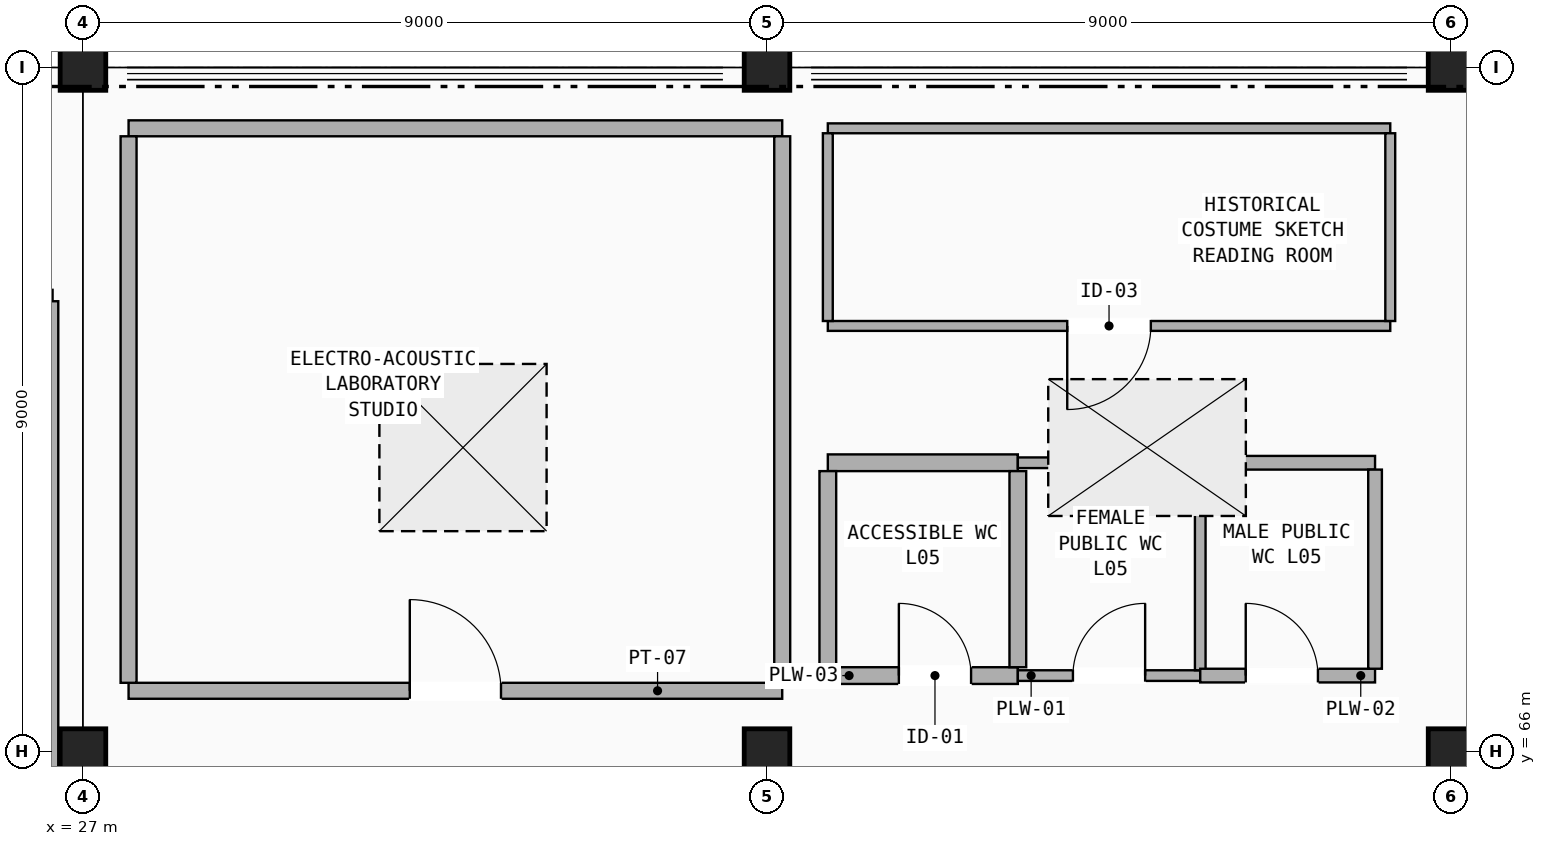
"""IFC4 building model, lengths in metres.
Left out: names, types, materials, properties, quantities, classifications, styles, units other than length and angle.
Written with IfcOpenShell. Run it as: python <this file> out.ifc"""

import sys

from ifc_helpers import new_model, si_unit, direction, frame, frame_2d, origin, origin_2d, place, context, subcontext, project, spatial, rectangle, extrude, element, fill, save


model = new_model("IFC4")
c1 = context("Model", 3, precision=1e-05, world=origin(), true_north=direction((0.0, 1.0)))
c2 = subcontext(c1, "Body", "Model", "MODEL_VIEW")
j1 = project(units=[si_unit("LENGTHUNIT", "METRE"), si_unit("PLANEANGLEUNIT", "RADIAN")], contexts=[c1])
p1 = place(None, origin())
s1 = spatial("IfcSite", under=j1, at=p1, CompositionType="ELEMENT")
p2 = place(p1, origin())
s2 = spatial("IfcBuilding", under=s1, at=p2, CompositionType="ELEMENT")
p3 = place(p2, frame((0.0, 0.0, 21.76)))
s3 = spatial("IfcBuildingStorey", under=s2, at=p3, CompositionType="ELEMENT", Elevation=21.76)
p4 = place(p3, frame((27.0, 66.0, 0.0), z_axis=(0.0, 0.0, 1.0), x_axis=(1.0, 0.0, 0.0)))
e1 = element("IfcColumn", 1, at=p4, inside=s3, PredefinedType="COLUMN", context=c2, shape_type="SweptSolid", body=[
    extrude(rectangle(XDim=0.6, YDim=0.6, at=origin_2d()), origin(), (0.0, 0.0, 1.0), 7.987),
])
p5 = place(p3, frame((27.0, 75.0, 0.0), z_axis=(0.0, 0.0, 1.0), x_axis=(1.0, 0.0, 0.0)))
e2 = element("IfcColumn", 2, at=p5, inside=s3, PredefinedType="COLUMN", context=c2, shape_type="SweptSolid", body=[
    extrude(rectangle(XDim=0.6, YDim=0.6, at=origin_2d()), origin(), (0.0, 0.0, 1.0), 9.0),
])
p6 = place(p3, frame((36.0, 66.0, 0.0), z_axis=(0.0, 0.0, 1.0), x_axis=(1.0, 0.0, 0.0)))
e3 = element("IfcColumn", 3, at=p6, inside=s3, PredefinedType="COLUMN", context=c2, shape_type="SweptSolid", body=[
    extrude(rectangle(XDim=0.6, YDim=0.6, at=origin_2d()), origin(), (0.0, 0.0, 1.0), 7.987),
])
p7 = place(p3, frame((36.0, 75.0, 0.0), z_axis=(0.0, 0.0, 1.0), x_axis=(1.0, 0.0, 0.0)))
e4 = element("IfcColumn", 4, at=p7, inside=s3, PredefinedType="COLUMN", context=c2, shape_type="SweptSolid", body=[
    extrude(rectangle(XDim=0.6, YDim=0.6, at=origin_2d()), origin(), (0.0, 0.0, 1.0), 9.0),
])
p8 = place(p3, frame((45.0, 66.0, 0.0), z_axis=(0.0, 0.0, 1.0), x_axis=(1.0, 0.0, 0.0)))
e5 = element("IfcColumn", 5, at=p8, inside=s3, PredefinedType="COLUMN", context=c2, shape_type="SweptSolid", body=[
    extrude(rectangle(XDim=0.6, YDim=0.6, at=origin_2d()), origin(), (0.0, 0.0, 1.0), 7.987),
])
p9 = place(p3, frame((45.0, 75.0, 0.0), z_axis=(0.0, 0.0, 1.0), x_axis=(1.0, 0.0, 0.0)))
e6 = element("IfcColumn", 6, at=p9, inside=s3, PredefinedType="COLUMN", context=c2, shape_type="SweptSolid", body=[
    extrude(rectangle(XDim=0.6, YDim=0.6, at=origin_2d()), origin(), (0.0, 0.0, 1.0), 9.0),
])
p10 = place(p3, frame((36.8, 67.0, 0.0), z_axis=(0.0, 0.0, 1.0), x_axis=(1.0, 0.0, 0.0)))
e7 = element("IfcWall", 7, at=p10, inside=s3, PredefinedType="PLUMBINGWALL", context=c2, shape_type="SweptSolid", body=[
    extrude(rectangle(XDim=2.5, YDim=0.22, at=frame_2d((1.25, 0.0))), origin(), (0.0, 0.0, 1.0), 8.521),
])
p11 = place(p10, frame((0.935, 0.0, 0.0)))
e8 = element("IfcOpeningElement", 8, at=p11, cuts=e7, PredefinedType="OPENING", context=c2, shape_type="SweptSolid", body=[
    extrude(rectangle(XDim=0.95, YDim=2.15, at=frame_2d((0.475, 1.075))), frame((0.0, 0.12, 0.0), z_axis=(0.0, -1.0, 0.0), x_axis=(1.0, 0.0, 0.0)), (0.0, 0.0, 1.0), 0.24),
])
p12 = place(p3, frame((36.8, 69.8, 0.0), z_axis=(0.0, 0.0, 1.0), x_axis=(1.0, 0.0, 0.0)))
e9 = element("IfcWall", 9, at=p12, inside=s3, PredefinedType="PLUMBINGWALL", context=c2, shape_type="SweptSolid", body=[
    extrude(rectangle(XDim=2.5, YDim=0.22, at=frame_2d((1.25, 0.0))), origin(), (0.0, 0.0, 1.0), 8.521),
])
for number, where, z_axis, x_axis in (
    (10, (36.8, 67.11, 0.0), (0.0, 0.0, 1.0), (0.0, 1.0, 0.0)),
    (11, (39.3, 67.11, 0.0), (0.0, 0.0, 1.0), (0.0, 1.0, 0.0)),
):
    element("IfcWall", number, at=place(p3, frame(where, z_axis=z_axis, x_axis=x_axis)), inside=s3, PredefinedType="PLUMBINGWALL", context=c2, shape_type="SweptSolid", body=[
        extrude(rectangle(XDim=2.58, YDim=0.22, at=frame_2d((1.29, 0.0))), origin(), (0.0, 0.0, 1.0), 8.521),
    ])
p13 = place(p3, frame((39.3, 67.0, 0.0), z_axis=(0.0, 0.0, 1.0), x_axis=(1.0, 0.0, 0.0)))
e12 = element("IfcWall", 12, at=p13, inside=s3, PredefinedType="PLUMBINGWALL", context=c2, shape_type="SweptSolid", body=[
    extrude(rectangle(XDim=2.4, YDim=0.14, at=frame_2d((1.2, 0.0))), origin(), (0.0, 0.0, 1.0), 8.521),
])
p14 = place(p13, frame((0.725, 0.0, 0.0)))
e13 = element("IfcOpeningElement", 13, at=p14, cuts=e12, PredefinedType="OPENING", context=c2, shape_type="SweptSolid", body=[
    extrude(rectangle(XDim=0.95, YDim=2.15, at=frame_2d((0.475, 1.075))), frame((0.0, 0.08, 0.0), z_axis=(0.0, -1.0, 0.0), x_axis=(1.0, 0.0, 0.0)), (0.0, 0.0, 1.0), 0.16),
])
p15 = place(p3, frame((39.3, 69.8, 0.0), z_axis=(0.0, 0.0, 1.0), x_axis=(1.0, 0.0, 0.0)))
e14 = element("IfcWall", 14, at=p15, inside=s3, PredefinedType="PLUMBINGWALL", context=c2, shape_type="SweptSolid", body=[
    extrude(rectangle(XDim=2.4, YDim=0.14, at=frame_2d((1.2, 0.0))), origin(), (0.0, 0.0, 1.0), 8.521),
])
p16 = place(p3, frame((41.7, 67.07, 0.0), z_axis=(0.0, 0.0, 1.0), x_axis=(0.0, 1.0, 0.0)))
e15 = element("IfcWall", 15, at=p16, inside=s3, PredefinedType="PLUMBINGWALL", context=c2, shape_type="SweptSolid", body=[
    extrude(rectangle(XDim=2.66, YDim=0.14, at=frame_2d((1.33, 0.0))), origin(), (0.0, 0.0, 1.0), 8.521),
])
p17 = place(p3, frame((41.7, 67.0, 0.0), z_axis=(0.0, 0.0, 1.0), x_axis=(1.0, 0.0, 0.0)))
e16 = element("IfcWall", 16, at=p17, inside=s3, PredefinedType="PLUMBINGWALL", context=c2, shape_type="SweptSolid", body=[
    extrude(rectangle(XDim=2.3, YDim=0.18, at=frame_2d((1.15, 0.0))), origin(), (0.0, 0.0, 1.0), 8.521),
])
p18 = place(p17, frame((0.598, 0.0, 0.0)))
e17 = element("IfcOpeningElement", 17, at=p18, cuts=e16, PredefinedType="OPENING", context=c2, shape_type="SweptSolid", body=[
    extrude(rectangle(XDim=0.95, YDim=2.15, at=frame_2d((0.475, 1.075))), frame((0.0, 0.1, 0.0), z_axis=(0.0, -1.0, 0.0), x_axis=(1.0, 0.0, 0.0)), (0.0, 0.0, 1.0), 0.2),
])
p19 = place(p3, frame((41.7, 69.8, 0.0), z_axis=(0.0, 0.0, 1.0), x_axis=(1.0, 0.0, 0.0)))
e18 = element("IfcWall", 18, at=p19, inside=s3, PredefinedType="PLUMBINGWALL", context=c2, shape_type="SweptSolid", body=[
    extrude(rectangle(XDim=2.3, YDim=0.18, at=frame_2d((1.15, 0.0))), origin(), (0.0, 0.0, 1.0), 8.521),
])
p20 = place(p3, frame((44.0, 67.09, 0.0), z_axis=(0.0, 0.0, 1.0), x_axis=(0.0, 1.0, 0.0)))
e19 = element("IfcWall", 19, at=p20, inside=s3, PredefinedType="PLUMBINGWALL", context=c2, shape_type="SweptSolid", body=[
    extrude(rectangle(XDim=2.62, YDim=0.18, at=frame_2d((1.31, 0.0))), origin(), (0.0, 0.0, 1.0), 8.521),
])
p21 = place(p3, frame((26.6, 56.275, 0.0), z_axis=(0.0, 0.0, 1.0), x_axis=(0.0, 1.0, 0.0)))
e20 = element("IfcWall", 20, at=p21, inside=s3, PredefinedType="PARTITIONING", context=c2, shape_type="SweptSolid", body=[
    extrude(rectangle(XDim=15.65, YDim=0.15, at=frame_2d((7.825, 0.0))), origin(), (0.0, 0.0, 1.0), 3.405),
])
p22 = place(p21, frame((6.119, 0.0, 0.0)))
e21 = element("IfcOpeningElement", 21, at=p22, cuts=e20, PredefinedType="OPENING", context=c2, shape_type="SweptSolid", body=[
    extrude(rectangle(XDim=1.4, YDim=2.2, at=frame_2d((0.7, 1.1))), frame((0.0, 0.085, 0.0), z_axis=(0.0, -1.0, 0.0), x_axis=(1.0, 0.0, 0.0)), (0.0, 0.0, 1.0), 0.17),
])
p23 = place(p3, frame((27.6, 66.8, 0.0), z_axis=(0.0, 0.0, 1.0), x_axis=(1.0, 0.0, 0.0)))
e22 = element("IfcWall", 22, at=p23, inside=s3, PredefinedType="PARTITIONING", context=c2, shape_type="SweptSolid", body=[
    extrude(rectangle(XDim=8.6, YDim=0.21, at=frame_2d((4.3, 0.0))), origin(), (0.0, 0.0, 1.0), 2.989),
])
p24 = place(p23, frame((3.7, 0.0, 0.0)))
e23 = element("IfcOpeningElement", 23, at=p24, cuts=e22, PredefinedType="OPENING", context=c2, shape_type="SweptSolid", body=[
    extrude(rectangle(XDim=1.2, YDim=2.2, at=frame_2d((0.6, 1.1))), frame((0.0, 0.115, 0.0), z_axis=(0.0, -1.0, 0.0), x_axis=(1.0, 0.0, 0.0)), (0.0, 0.0, 1.0), 0.23),
])
p25 = place(p3, frame((27.6, 74.2, 0.0), z_axis=(0.0, 0.0, 1.0), x_axis=(1.0, 0.0, 0.0)))
e24 = element("IfcWall", 24, at=p25, inside=s3, PredefinedType="PARTITIONING", context=c2, shape_type="SweptSolid", body=[
    extrude(rectangle(XDim=8.6, YDim=0.21, at=frame_2d((4.3, 0.0))), origin(), (0.0, 0.0, 1.0), 2.989),
])
p26 = place(p3, frame((27.6, 66.905, 0.0), z_axis=(0.0, 0.0, 1.0), x_axis=(0.0, 1.0, 0.0)))
e25 = element("IfcWall", 25, at=p26, inside=s3, PredefinedType="PARTITIONING", context=c2, shape_type="SweptSolid", body=[
    extrude(rectangle(XDim=7.19, YDim=0.21, at=frame_2d((3.595, 0.0))), origin(), (0.0, 0.0, 1.0), 8.426),
])
p27 = place(p3, frame((36.2, 66.905, 0.0), z_axis=(0.0, 0.0, 1.0), x_axis=(0.0, 1.0, 0.0)))
e26 = element("IfcWall", 26, at=p27, inside=s3, PredefinedType="PARTITIONING", context=c2, shape_type="SweptSolid", body=[
    extrude(rectangle(XDim=7.19, YDim=0.21, at=frame_2d((3.595, 0.0))), origin(), (0.0, 0.0, 1.0), 2.989),
])
p28 = place(p3, frame((36.8, 71.6, 0.0), z_axis=(0.0, 0.0, 1.0), x_axis=(1.0, 0.0, 0.0)))
e27 = element("IfcWall", 27, at=p28, inside=s3, PredefinedType="PARTITIONING", context=c2, shape_type="SweptSolid", body=[
    extrude(rectangle(XDim=7.4, YDim=0.13, at=frame_2d((3.7, 0.0))), origin(), (0.0, 0.0, 1.0), 8.78),
])
p29 = place(p28, frame((3.15, 0.0, 0.0)))
e28 = element("IfcOpeningElement", 28, at=p29, cuts=e27, PredefinedType="OPENING", context=c2, shape_type="SweptSolid", body=[
    extrude(rectangle(XDim=1.1, YDim=2.2, at=frame_2d((0.55, 1.1))), frame((0.0, 0.075, 0.0), z_axis=(0.0, -1.0, 0.0), x_axis=(1.0, 0.0, 0.0)), (0.0, 0.0, 1.0), 0.15),
])
p30 = place(p3, frame((36.8, 74.2, 0.0), z_axis=(0.0, 0.0, 1.0), x_axis=(1.0, 0.0, 0.0)))
e29 = element("IfcWall", 29, at=p30, inside=s3, PredefinedType="PARTITIONING", context=c2, shape_type="SweptSolid", body=[
    extrude(rectangle(XDim=7.4, YDim=0.13, at=frame_2d((3.7, 0.0))), origin(), (0.0, 0.0, 1.0), 8.78),
])
for number, where, z_axis, x_axis in (
    (30, (36.8, 71.665, 0.0), (0.0, 0.0, 1.0), (0.0, 1.0, 0.0)),
    (31, (44.2, 71.665, 0.0), (0.0, 0.0, 1.0), (0.0, 1.0, 0.0)),
):
    element("IfcWall", number, at=place(p3, frame(where, z_axis=z_axis, x_axis=x_axis)), inside=s3, PredefinedType="PARTITIONING", context=c2, shape_type="SweptSolid", body=[
        extrude(rectangle(XDim=2.47, YDim=0.13, at=frame_2d((1.235, 0.0))), origin(), (0.0, 0.0, 1.0), 8.78),
    ])
p31 = place(p3, frame((0.0, 0.0, -0.24)))
p32 = place(p31, frame((32.0, 70.0, 0.19)))
e32 = element("IfcWindow", 32, at=p32, inside=s3, PartitioningType="SINGLE_PANEL", PredefinedType="SKYLIGHT", context=c2, shape_type="SweptSolid", body=[
    extrude(rectangle(XDim=2.2, YDim=2.2, at=origin_2d()), origin(), (0.0, 0.0, 1.0), 0.05),
])
p33 = place(p31, frame((41.0, 70.0, 0.19)))
e33 = element("IfcWindow", 33, at=p33, inside=s3, PartitioningType="SINGLE_PANEL", PredefinedType="SKYLIGHT", context=c2, shape_type="SweptSolid", body=[
    extrude(rectangle(XDim=2.6, YDim=1.8, at=origin_2d()), origin(), (0.0, 0.0, 1.0), 0.05),
])
p34 = place(p11, origin())
e34 = element("IfcDoor", 34, at=p34, inside=s3, OperationType="SINGLE_SWING_LEFT", PredefinedType="DOOR", context=c2, shape_type="SweptSolid", body=[
    extrude(rectangle(XDim=0.95, YDim=2.15, at=frame_2d((0.475, 1.075))), frame((0.0, 0.025, 0.0), z_axis=(0.0, -1.0, 0.0), x_axis=(1.0, 0.0, 0.0)), (0.0, 0.0, 1.0), 0.05),
])
fill(e8, e34)
p35 = place(p14, origin())
e35 = element("IfcDoor", 35, at=p35, inside=s3, OperationType="SINGLE_SWING_RIGHT", PredefinedType="DOOR", context=c2, shape_type="SweptSolid", body=[
    extrude(rectangle(XDim=0.95, YDim=2.15, at=frame_2d((0.475, 1.075))), frame((0.0, 0.025, 0.0), z_axis=(0.0, -1.0, 0.0), x_axis=(1.0, 0.0, 0.0)), (0.0, 0.0, 1.0), 0.05),
])
fill(e13, e35)
p36 = place(p18, origin())
e36 = element("IfcDoor", 36, at=p36, inside=s3, OperationType="SINGLE_SWING_LEFT", PredefinedType="DOOR", context=c2, shape_type="SweptSolid", body=[
    extrude(rectangle(XDim=0.95, YDim=2.15, at=frame_2d((0.475, 1.075))), frame((0.0, 0.025, 0.0), z_axis=(0.0, -1.0, 0.0), x_axis=(1.0, 0.0, 0.0)), (0.0, 0.0, 1.0), 0.05),
])
fill(e17, e36)
p37 = place(p24, origin())
e37 = element("IfcDoor", 37, at=p37, inside=s3, OperationType="SINGLE_SWING_LEFT", PredefinedType="DOOR", context=c2, shape_type="SweptSolid", body=[
    extrude(rectangle(XDim=1.2, YDim=2.2, at=frame_2d((0.6, 1.1))), frame((0.0, 0.025, 0.0), z_axis=(0.0, -1.0, 0.0), x_axis=(1.0, 0.0, 0.0)), (0.0, 0.0, 1.0), 0.05),
])
fill(e23, e37)
p38 = place(p29, frame((1.1, 0.0, 0.0), z_axis=(0.0, 0.0, 1.0), x_axis=(-1.0, 0.0, 0.0)))
e38 = element("IfcDoor", 38, at=p38, inside=s3, OperationType="SINGLE_SWING_RIGHT", PredefinedType="DOOR", context=c2, shape_type="SweptSolid", body=[
    extrude(rectangle(XDim=1.1, YDim=2.2, at=frame_2d((0.55, 1.1))), frame((0.0, 0.025, 0.0), z_axis=(0.0, -1.0, 0.0), x_axis=(1.0, 0.0, 0.0)), (0.0, 0.0, 1.0), 0.05),
])
fill(e28, e38)
save(model, sys.argv[1])
